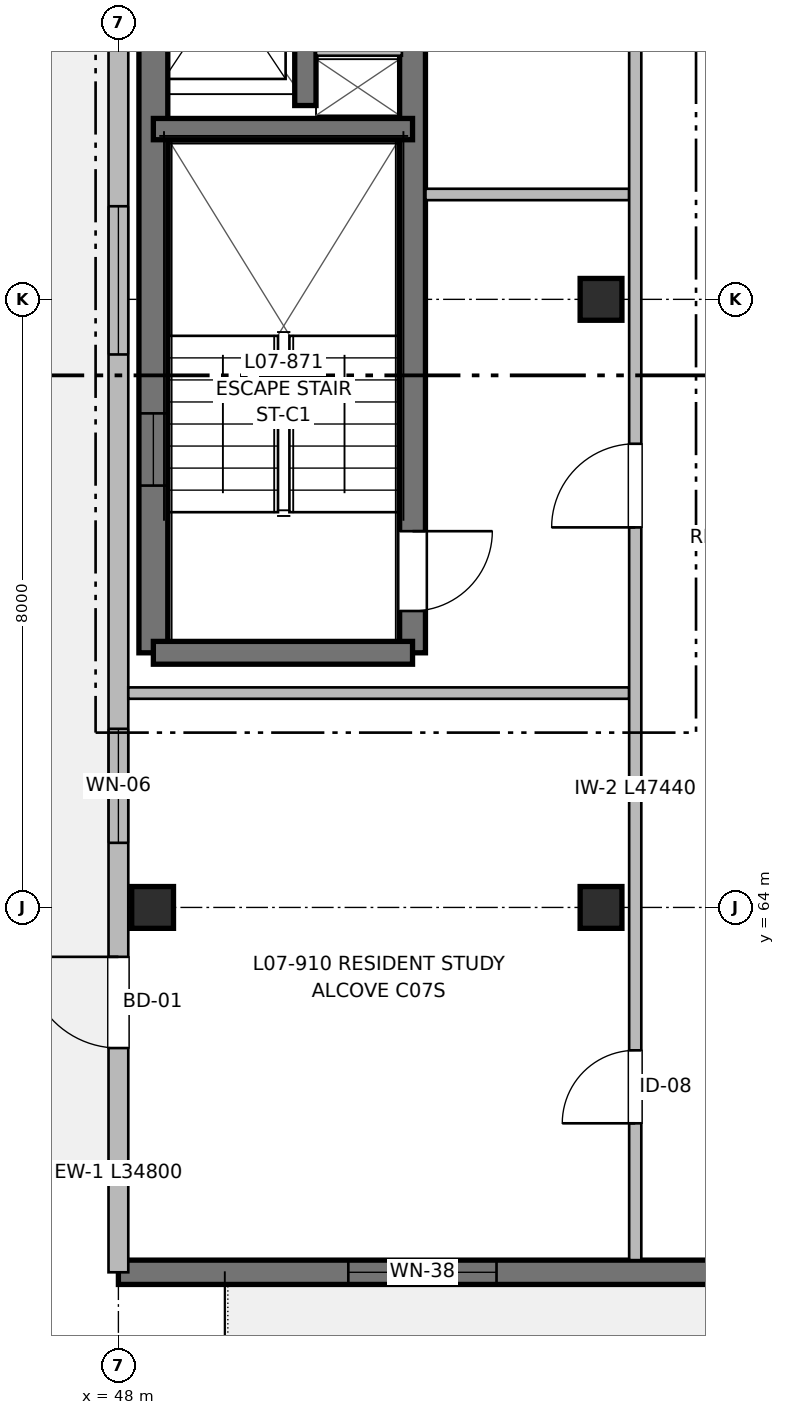
"""IFC4 building model, lengths in metres.
Left out: names, types, materials, properties, quantities, classifications, styles, units other than length and angle.
Written with IfcOpenShell. Run it as: python <this file> out.ifc"""

import sys

from ifc_helpers import new_model, si_unit, direction, frame, frame_2d, origin, origin_2d, place, context, subcontext, project, spatial, rectangle, extrude, element, fill, save


model = new_model("IFC4")
c1 = context("Model", 3, precision=1e-05, world=origin(), true_north=direction((0.0, 1.0)))
c2 = subcontext(c1, "Body", "Model", "MODEL_VIEW")
j1 = project(units=[si_unit("LENGTHUNIT", "METRE"), si_unit("PLANEANGLEUNIT", "RADIAN")], contexts=[c1])
p1 = place(None, origin())
s1 = spatial("IfcSite", under=j1, at=p1, CompositionType="ELEMENT")
p2 = place(p1, origin())
s2 = spatial("IfcBuilding", under=s1, at=p2, CompositionType="ELEMENT")
p3 = place(p2, frame((0.0, 0.0, 23.36)))
s3 = spatial("IfcBuildingStorey", under=s2, at=p3, CompositionType="ELEMENT", Elevation=23.36)
for number, where, z_axis, x_axis in (
    (1, (48.45, 64.0, 0.0), (0.0, 0.0, 1.0), (1.0, 0.0, 0.0)),
    (2, (54.35, 64.0, 0.0), (0.0, 0.0, 1.0), (1.0, 0.0, 0.0)),
    (3, (54.35, 72.0, 0.0), (0.0, 0.0, 1.0), (1.0, 0.0, 0.0)),
):
    element("IfcColumn", number, at=place(p3, frame(where, z_axis=z_axis, x_axis=x_axis)), inside=s3, PredefinedType="COLUMN", context=c2, shape_type="SweptSolid", body=[
        extrude(rectangle(XDim=0.55, YDim=0.55, at=origin_2d()), origin(), (0.0, 0.0, 1.0), 3.2),
    ])
p4 = place(p3, frame((48.46, 67.35, 0.0), z_axis=(0.0, 0.0, 1.0), x_axis=(0.0, 1.0, 0.0)))
e4 = element("IfcWall", 4, at=p4, inside=s3, PredefinedType="SHEAR", context=c2, shape_type="SweptSolid", body=[
    extrude(rectangle(XDim=12.45, YDim=0.38, at=frame_2d((6.225, 0.0))), origin(), (0.0, 0.0, 1.0), 3.2),
])
p5 = place(p4, frame((2.2, 0.0, 0.97)))
e5 = element("IfcOpeningElement", 5, at=p5, cuts=e4, PredefinedType="OPENING", context=c2, shape_type="SweptSolid", body=[
    extrude(rectangle(XDim=0.95, YDim=1.25, at=frame_2d((0.475, 0.625))), frame((0.0, 0.2, 0.0), z_axis=(0.0, -1.0, 0.0), x_axis=(1.0, 0.0, 0.0)), (0.0, 0.0, 1.0), 0.4),
])
p6 = place(p3, frame((51.87, 79.8, 0.0), z_axis=(0.0, 0.0, 1.0), x_axis=(0.0, -1.0, 0.0)))
e6 = element("IfcWall", 6, at=p6, inside=s3, PredefinedType="SHEAR", context=c2, shape_type="SweptSolid", body=[
    extrude(rectangle(XDim=12.45, YDim=0.34, at=frame_2d((6.225, 0.0))), origin(), (0.0, 0.0, 1.0), 3.2),
])
p7 = place(p6, frame((10.85, 0.0, 0.0)))
e7 = element("IfcOpeningElement", 7, at=p7, cuts=e6, PredefinedType="OPENING", context=c2, shape_type="SweptSolid", body=[
    extrude(rectangle(XDim=1.05, YDim=2.15, at=frame_2d((0.525, 1.075))), frame((0.0, 0.18, 0.0), z_axis=(0.0, -1.0, 0.0), x_axis=(1.0, 0.0, 0.0)), (0.0, 0.0, 1.0), 0.36),
])
p8 = place(p3, frame((51.87, 67.35, 0.0), z_axis=(0.0, 0.0, 1.0), x_axis=(-1.0, 0.0, 0.0)))
e8 = element("IfcWall", 8, at=p8, inside=s3, PredefinedType="SHEAR", context=c2, shape_type="SweptSolid", body=[
    extrude(rectangle(XDim=3.41, YDim=0.3, at=frame_2d((1.705, 0.0))), origin(), (0.0, 0.0, 1.0), 3.2),
])
p9 = place(p3, frame((48.46, 74.24, 0.0), z_axis=(0.0, 0.0, 1.0), x_axis=(1.0, 0.0, 0.0)))
e9 = element("IfcWall", 9, at=p9, inside=s3, PredefinedType="SHEAR", context=c2, shape_type="SweptSolid", body=[
    extrude(rectangle(XDim=3.41, YDim=0.28, at=frame_2d((1.705, 0.0))), origin(), (0.0, 0.0, 1.0), 3.2),
])
p10 = place(p3, frame((50.46, 74.55, 0.0), z_axis=(0.0, 0.0, 1.0), x_axis=(0.0, 1.0, 0.0)))
e10 = element("IfcWall", 10, at=p10, inside=s3, PredefinedType="SHEAR", context=c2, shape_type="SweptSolid", body=[
    extrude(rectangle(XDim=5.25, YDim=0.28, at=frame_2d((2.625, 0.0))), origin(), (0.0, 0.0, 1.0), 3.2),
])
p11 = place(p10, frame((1.15, 0.0, 0.0)))
e11 = element("IfcOpeningElement", 11, at=p11, cuts=e10, PredefinedType="OPENING", context=c2, shape_type="SweptSolid", body=[
    extrude(rectangle(XDim=1.0, YDim=2.15, at=frame_2d((0.5, 1.075))), frame((0.0, 0.15, 0.0), z_axis=(0.0, -1.0, 0.0), x_axis=(1.0, 0.0, 0.0)), (0.0, 0.0, 1.0), 0.3),
])
p12 = place(p10, frame((3.85, 0.0, 0.0)))
e12 = element("IfcOpeningElement", 12, at=p12, cuts=e10, PredefinedType="OPENING", context=c2, shape_type="SweptSolid", body=[
    extrude(rectangle(XDim=0.9, YDim=2.15, at=frame_2d((0.45, 1.075))), frame((0.0, 0.15, 0.0), z_axis=(0.0, -1.0, 0.0), x_axis=(1.0, 0.0, 0.0)), (0.0, 0.0, 1.0), 0.3),
])
p13 = place(p3, frame((50.6, 75.28, 0.0), z_axis=(0.0, 0.0, 1.0), x_axis=(1.0, 0.0, 0.0)))
e13 = element("IfcWall", 13, at=p13, inside=s3, PredefinedType="PARTITIONING", context=c2, shape_type="SweptSolid", body=[
    extrude(rectangle(XDim=1.13, YDim=0.15, at=frame_2d((0.565, 0.0))), origin(), (0.0, 0.0, 1.0), 2.95),
])
p14 = place(p3, frame((64.0, 59.2, 0.0), z_axis=(0.0, 0.0, 1.0), x_axis=(-1.0, 0.0, 0.0)))
e14 = element("IfcWall", 14, at=p14, inside=s3, PredefinedType="SHEAR", context=c2, shape_type="SweptSolid", body=[
    extrude(rectangle(XDim=16.0, YDim=0.32, at=frame_2d((8.0, 0.0))), origin(), (0.0, 0.0, 1.0), 2.98),
])
p15 = place(p14, frame((2.55, 0.0, 0.0)))
e15 = element("IfcOpeningElement", 15, at=p15, cuts=e14, PredefinedType="OPENING", context=c2, shape_type="SweptSolid", body=[
    extrude(rectangle(XDim=1.2, YDim=2.2, at=frame_2d((0.6, 1.1))), frame((0.0, 0.17, 0.0), z_axis=(0.0, -1.0, 0.0), x_axis=(1.0, 0.0, 0.0)), (0.0, 0.0, 1.0), 0.34),
])
p16 = place(p14, frame((4.85, 0.0, 0.82)))
e16 = element("IfcOpeningElement", 16, at=p16, cuts=e14, PredefinedType="OPENING", context=c2, shape_type="SweptSolid", body=[
    extrude(rectangle(XDim=1.5, YDim=1.4, at=frame_2d((0.75, 0.7))), frame((0.0, 0.17, 0.0), z_axis=(0.0, -1.0, 0.0), x_axis=(1.0, 0.0, 0.0)), (0.0, 0.0, 1.0), 0.34),
])
p17 = place(p14, frame((11.025, 0.0, 0.72)))
e17 = element("IfcOpeningElement", 17, at=p17, cuts=e14, PredefinedType="OPENING", context=c2, shape_type="SweptSolid", body=[
    extrude(rectangle(XDim=1.95, YDim=1.5, at=frame_2d((0.975, 0.75))), frame((0.0, 0.17, 0.0), z_axis=(0.0, -1.0, 0.0), x_axis=(1.0, 0.0, 0.0)), (0.0, 0.0, 1.0), 0.34),
])
p18 = place(p3, frame((48.0, 59.2, 0.0), z_axis=(0.0, 0.0, 1.0), x_axis=(0.0, 1.0, 0.0)))
e18 = element("IfcWall", 18, at=p18, inside=s3, PredefinedType="SOLIDWALL", context=c2, shape_type="SweptSolid", body=[
    extrude(rectangle(XDim=34.8, YDim=0.26, at=frame_2d((17.4, 0.0))), origin(), (0.0, 0.0, 1.0), 2.98),
])
p19 = place(p18, frame((2.95, 0.0, 0.0)))
e19 = element("IfcOpeningElement", 19, at=p19, cuts=e18, PredefinedType="OPENING", context=c2, shape_type="SweptSolid", body=[
    extrude(rectangle(XDim=1.2, YDim=2.2, at=frame_2d((0.6, 1.1))), frame((0.0, 0.14, 0.0), z_axis=(0.0, -1.0, 0.0), x_axis=(1.0, 0.0, 0.0)), (0.0, 0.0, 1.0), 0.28),
])
p20 = place(p18, frame((5.65, 0.0, 0.82)))
e20 = element("IfcOpeningElement", 20, at=p20, cuts=e18, PredefinedType="OPENING", context=c2, shape_type="SweptSolid", body=[
    extrude(rectangle(XDim=1.5, YDim=1.4, at=frame_2d((0.75, 0.7))), frame((0.0, 0.14, 0.0), z_axis=(0.0, -1.0, 0.0), x_axis=(1.0, 0.0, 0.0)), (0.0, 0.0, 1.0), 0.28),
])
p21 = place(p18, frame((12.075, 0.0, 0.72)))
e21 = element("IfcOpeningElement", 21, at=p21, cuts=e18, PredefinedType="OPENING", context=c2, shape_type="SweptSolid", body=[
    extrude(rectangle(XDim=1.95, YDim=1.5, at=frame_2d((0.975, 0.75))), frame((0.0, 0.14, 0.0), z_axis=(0.0, -1.0, 0.0), x_axis=(1.0, 0.0, 0.0)), (0.0, 0.0, 1.0), 0.28),
])
p22 = place(p18, frame((29.61, 0.0, 0.72)))
e22 = element("IfcOpeningElement", 22, at=p22, cuts=e18, PredefinedType="OPENING", context=c2, shape_type="SweptSolid", body=[
    extrude(rectangle(XDim=1.68, YDim=1.5, at=frame_2d((0.84, 0.75))), frame((0.0, 0.14, 0.0), z_axis=(0.0, -1.0, 0.0), x_axis=(1.0, 0.0, 0.0)), (0.0, 0.0, 1.0), 0.28),
])
p23 = place(p3, frame((48.13, 66.82, 0.0), z_axis=(0.0, 0.0, 1.0), x_axis=(1.0, 0.0, 0.0)))
e23 = element("IfcWall", 23, at=p23, inside=s3, PredefinedType="PARTITIONING", context=c2, shape_type="SweptSolid", body=[
    extrude(rectangle(XDim=6.59, YDim=0.15, at=frame_2d((3.295, 0.0))), origin(), (0.0, 0.0, 1.0), 2.935),
])
p24 = place(p3, frame((52.04, 73.38, 0.0), z_axis=(0.0, 0.0, 1.0), x_axis=(1.0, 0.0, 0.0)))
e24 = element("IfcWall", 24, at=p24, inside=s3, PredefinedType="PARTITIONING", context=c2, shape_type="SweptSolid", body=[
    extrude(rectangle(XDim=2.68, YDim=0.15, at=frame_2d((1.34, 0.0))), origin(), (0.0, 0.0, 1.0), 2.935),
])
p25 = place(p3, frame((54.8, 59.36, 0.0), z_axis=(0.0, 0.0, 1.0), x_axis=(0.0, 1.0, 0.0)))
e25 = element("IfcWall", 25, at=p25, inside=s3, PredefinedType="PARTITIONING", context=c2, shape_type="SweptSolid", body=[
    extrude(rectangle(XDim=47.44, YDim=0.16, at=frame_2d((23.72, 0.0))), origin(), (0.0, 0.0, 1.0), 2.935),
])
p26 = place(p25, frame((9.64, 0.0, 0.0)))
e26 = element("IfcOpeningElement", 26, at=p26, cuts=e25, PredefinedType="OPENING", context=c2, shape_type="SweptSolid", body=[
    extrude(rectangle(XDim=1.1, YDim=2.15, at=frame_2d((0.55, 1.075))), frame((0.0, 0.09, 0.0), z_axis=(0.0, -1.0, 0.0), x_axis=(1.0, 0.0, 0.0)), (0.0, 0.0, 1.0), 0.18),
])
p27 = place(p25, frame((16.04, 0.0, 0.0)))
e27 = element("IfcOpeningElement", 27, at=p27, cuts=e25, PredefinedType="OPENING", context=c2, shape_type="SweptSolid", body=[
    extrude(rectangle(XDim=1.6, YDim=2.15, at=frame_2d((0.8, 1.075))), frame((0.0, 0.09, 0.0), z_axis=(0.0, -1.0, 0.0), x_axis=(1.0, 0.0, 0.0)), (0.0, 0.0, 1.0), 0.18),
])
p28 = place(p25, frame((1.8, 0.0, 0.0)))
e28 = element("IfcOpeningElement", 28, at=p28, cuts=e25, PredefinedType="OPENING", context=c2, shape_type="SweptSolid", body=[
    extrude(rectangle(XDim=0.96, YDim=2.15, at=frame_2d((0.48, 1.075))), frame((0.0, 0.09, 0.0), z_axis=(0.0, -1.0, 0.0), x_axis=(1.0, 0.0, 0.0)), (0.0, 0.0, 1.0), 0.18),
])
p29 = place(p25, frame((29.545, 0.0, 0.0)))
e29 = element("IfcOpeningElement", 29, at=p29, cuts=e25, PredefinedType="OPENING", context=c2, shape_type="SweptSolid", body=[
    extrude(rectangle(XDim=0.98, YDim=2.15, at=frame_2d((0.49, 1.075))), frame((0.0, 0.09, 0.0), z_axis=(0.0, -1.0, 0.0), x_axis=(1.0, 0.0, 0.0)), (0.0, 0.0, 1.0), 0.18),
])
p30 = place(p25, frame((37.755, 0.0, 0.0)))
e30 = element("IfcOpeningElement", 30, at=p30, cuts=e25, PredefinedType="OPENING", context=c2, shape_type="SweptSolid", body=[
    extrude(rectangle(XDim=0.98, YDim=2.15, at=frame_2d((0.49, 1.075))), frame((0.0, 0.09, 0.0), z_axis=(0.0, -1.0, 0.0), x_axis=(1.0, 0.0, 0.0)), (0.0, 0.0, 1.0), 0.18),
])
p31 = place(p7, origin())
e31 = element("IfcDoor", 31, at=p31, inside=s3, OperationType="SINGLE_SWING_LEFT", PredefinedType="DOOR", context=c2, shape_type="SweptSolid", body=[
    extrude(rectangle(XDim=1.05, YDim=2.15, at=frame_2d((0.525, 1.075))), frame((0.0, 0.025, 0.0), z_axis=(0.0, -1.0, 0.0), x_axis=(1.0, 0.0, 0.0)), (0.0, 0.0, 1.0), 0.05),
])
fill(e7, e31)
p32 = place(p5, origin())
e32 = element("IfcWindow", 32, at=p32, inside=s3, PartitioningType="SINGLE_PANEL", PredefinedType="WINDOW", context=c2, shape_type="SweptSolid", body=[
    extrude(rectangle(XDim=0.95, YDim=1.25, at=frame_2d((0.475, 0.625))), frame((0.0, 0.03, 0.0), z_axis=(0.0, -1.0, 0.0), x_axis=(1.0, 0.0, 0.0)), (0.0, 0.0, 1.0), 0.06),
])
fill(e5, e32)
p33 = place(p17, origin())
e33 = element("IfcWindow", 33, at=p33, inside=s3, PartitioningType="SINGLE_PANEL", PredefinedType="WINDOW", context=c2, shape_type="SweptSolid", body=[
    extrude(rectangle(XDim=1.95, YDim=1.5, at=frame_2d((0.975, 0.75))), frame((0.0, 0.03, 0.0), z_axis=(0.0, -1.0, 0.0), x_axis=(1.0, 0.0, 0.0)), (0.0, 0.0, 1.0), 0.06),
])
fill(e17, e33)
p34 = place(p19, origin())
e34 = element("IfcDoor", 34, at=p34, inside=s3, OperationType="SINGLE_SWING_RIGHT", PredefinedType="DOOR", context=c2, shape_type="SweptSolid", body=[
    extrude(rectangle(XDim=1.2, YDim=2.2, at=frame_2d((0.6, 1.1))), frame((0.0, 0.025, 0.0), z_axis=(0.0, -1.0, 0.0), x_axis=(1.0, 0.0, 0.0)), (0.0, 0.0, 1.0), 0.05),
])
fill(e19, e34)
p35 = place(p20, origin())
e35 = element("IfcWindow", 35, at=p35, inside=s3, PartitioningType="SINGLE_PANEL", PredefinedType="WINDOW", context=c2, shape_type="SweptSolid", body=[
    extrude(rectangle(XDim=1.5, YDim=1.4, at=frame_2d((0.75, 0.7))), frame((0.0, 0.03, 0.0), z_axis=(0.0, -1.0, 0.0), x_axis=(1.0, 0.0, 0.0)), (0.0, 0.0, 1.0), 0.06),
])
fill(e20, e35)
p36 = place(p21, origin())
e36 = element("IfcWindow", 36, at=p36, inside=s3, PartitioningType="SINGLE_PANEL", PredefinedType="WINDOW", context=c2, shape_type="SweptSolid", body=[
    extrude(rectangle(XDim=1.95, YDim=1.5, at=frame_2d((0.975, 0.75))), frame((0.0, 0.03, 0.0), z_axis=(0.0, -1.0, 0.0), x_axis=(1.0, 0.0, 0.0)), (0.0, 0.0, 1.0), 0.06),
])
fill(e21, e36)
p37 = place(p26, origin())
e37 = element("IfcDoor", 37, at=p37, inside=s3, OperationType="SINGLE_SWING_LEFT", PredefinedType="DOOR", context=c2, shape_type="SweptSolid", body=[
    extrude(rectangle(XDim=1.1, YDim=2.15, at=frame_2d((0.55, 1.075))), frame((0.0, 0.025, 0.0), z_axis=(0.0, -1.0, 0.0), x_axis=(1.0, 0.0, 0.0)), (0.0, 0.0, 1.0), 0.05),
])
fill(e26, e37)
p38 = place(p28, origin())
e38 = element("IfcDoor", 38, at=p38, inside=s3, OperationType="SINGLE_SWING_LEFT", PredefinedType="DOOR", context=c2, shape_type="SweptSolid", body=[
    extrude(rectangle(XDim=0.96, YDim=2.15, at=frame_2d((0.48, 1.075))), frame((0.0, 0.025, 0.0), z_axis=(0.0, -1.0, 0.0), x_axis=(1.0, 0.0, 0.0)), (0.0, 0.0, 1.0), 0.05),
])
fill(e28, e38)
save(model, sys.argv[1])
